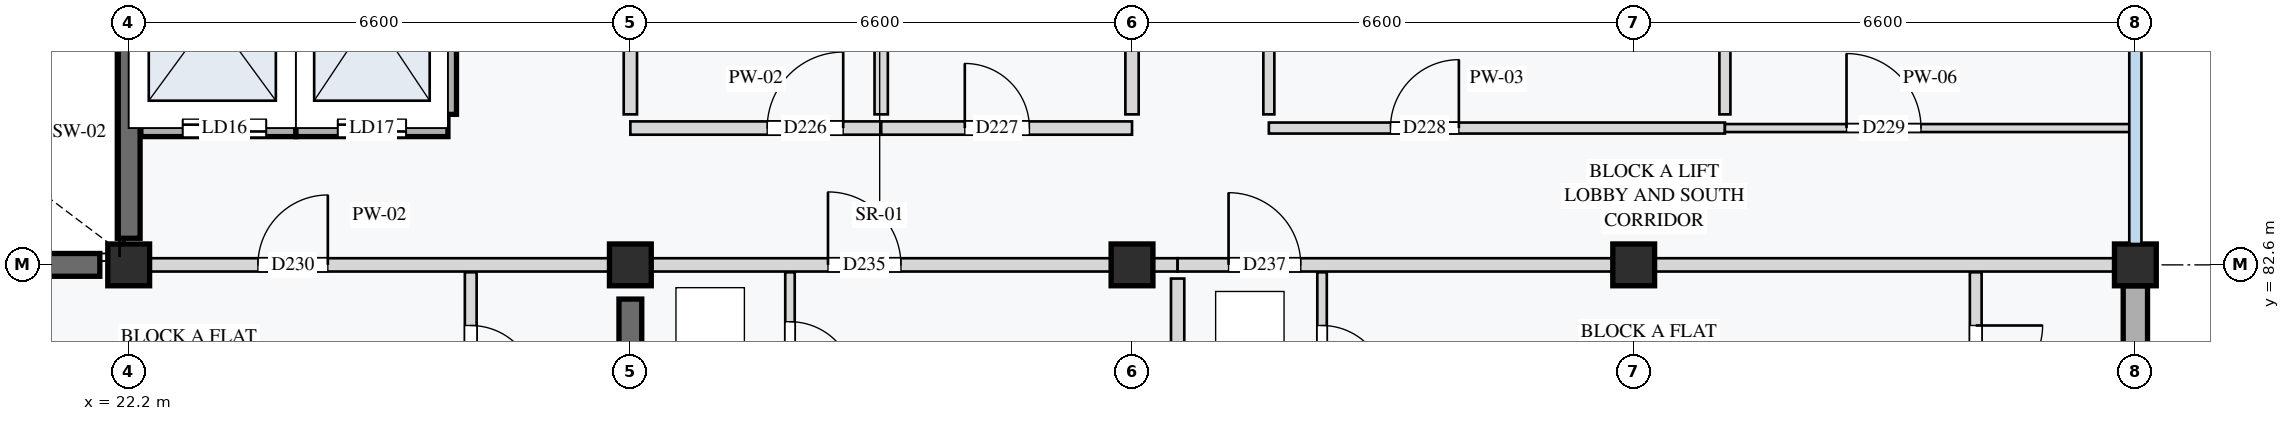
"""IFC4 building model, lengths in metres.
Left out: names, types, materials, properties, quantities, classifications, styles, units other than length and angle.
Written with IfcOpenShell. Run it as: python <this file> out.ifc"""

import sys

from ifc_helpers import new_model, si_unit, direction, frame, frame_2d, origin, origin_2d, place, context, subcontext, project, spatial, rectangle, extrude, element, fill, save


model = new_model("IFC4")
c1 = context("Model", 3, precision=1e-05, world=origin(), true_north=direction((0.0, 1.0)))
c2 = subcontext(c1, "Body", "Model", "MODEL_VIEW")
j1 = project(units=[si_unit("LENGTHUNIT", "METRE"), si_unit("PLANEANGLEUNIT", "RADIAN")], contexts=[c1])
p1 = place(None, origin())
s1 = spatial("IfcSite", under=j1, at=p1, CompositionType="ELEMENT")
p2 = place(p1, origin())
s2 = spatial("IfcBuilding", under=s1, at=p2, CompositionType="ELEMENT")
p3 = place(p2, frame((0.0, 0.0, 24.4)))
s3 = spatial("IfcBuildingStorey", under=s2, at=p3, CompositionType="ELEMENT", Elevation=24.4)
for number, where, z_axis, x_axis in (
    (1, (22.2, 82.6, 0.0), (0.0, 0.0, 1.0), (1.0, 0.0, 0.0)),
    (2, (28.8, 82.6, 0.0), (0.0, 0.0, 1.0), (1.0, 0.0, 0.0)),
    (3, (35.4, 82.6, 0.0), (0.0, 0.0, 1.0), (1.0, 0.0, 0.0)),
    (4, (42.0, 82.6, 0.0), (0.0, 0.0, 1.0), (1.0, 0.0, 0.0)),
    (5, (48.6, 82.6, 0.0), (0.0, 0.0, 1.0), (1.0, 0.0, 0.0)),
):
    element("IfcColumn", number, at=place(p3, frame(where, z_axis=z_axis, x_axis=x_axis)), inside=s3, PredefinedType="COLUMN", context=c2, shape_type="SweptSolid", body=[
        extrude(rectangle(XDim=0.55, YDim=0.55, at=origin_2d()), origin(), (0.0, 0.0, 1.0), 3.2),
    ])
p4 = place(p3, frame((15.98, 82.6, 0.0), z_axis=(0.0, 0.0, 1.0), x_axis=(1.0, 0.0, 0.0)))
e6 = element("IfcWall", 6, at=p4, inside=s3, PredefinedType="SHEAR", context=c2, shape_type="SweptSolid", body=[
    extrude(rectangle(XDim=5.84, YDim=0.3, at=frame_2d((2.92, 0.0))), origin(), (0.0, 0.0, 1.0), 2.97),
])
p5 = place(p3, frame((22.2, 82.95, 0.0), z_axis=(0.0, 0.0, 1.0), x_axis=(0.0, 1.0, 0.0)))
e7 = element("IfcWall", 7, at=p5, inside=s3, PredefinedType="SHEAR", context=c2, shape_type="SweptSolid", body=[
    extrude(rectangle(XDim=2.8, YDim=0.3, at=frame_2d((1.4, 0.0))), origin(), (0.0, 0.0, 1.0), 2.97),
])
p6 = place(p3, frame((28.8, 76.45, 0.0), z_axis=(0.0, 0.0, 1.0), x_axis=(0.0, 1.0, 0.0)))
e8 = element("IfcWall", 8, at=p6, inside=s3, PredefinedType="SHEAR", context=c2, shape_type="SweptSolid", body=[
    extrude(rectangle(XDim=5.7, YDim=0.3, at=frame_2d((2.85, 0.0))), origin(), (0.0, 0.0, 1.0), 2.97),
])
p7 = place(p3, frame((48.6, 76.275, 0.0), z_axis=(0.0, 0.0, 1.0), x_axis=(0.0, 1.0, 0.0)))
e9 = element("IfcWall", 9, at=p7, inside=s3, PredefinedType="STANDARD", context=c2, shape_type="SweptSolid", body=[
    extrude(rectangle(XDim=6.05, YDim=0.32, at=frame_2d((3.025, 0.0))), origin(), (0.0, 0.0, 1.0), 2.65),
])
p8 = place(p3, frame((22.36, 84.4, 0.0), z_axis=(0.0, 0.0, 1.0), x_axis=(1.0, 0.0, 0.0)))
e10 = element("IfcWall", 10, at=p8, inside=s3, PredefinedType="STANDARD", context=c2, shape_type="SweptSolid", body=[
    extrude(rectangle(XDim=2.04, YDim=0.225, at=frame_2d((1.02, 0.0))), origin(), (0.0, 0.0, 1.0), 2.97),
])
p9 = place(p8, frame((0.55, 0.0, 0.0)))
e11 = element("IfcOpeningElement", 11, at=p9, cuts=e10, PredefinedType="OPENING", context=c2, shape_type="SweptSolid", body=[
    extrude(rectangle(XDim=1.1, YDim=2.1, at=frame_2d((0.55, 1.05))), frame((0.0, 0.123, 0.0), z_axis=(0.0, -1.0, 0.0), x_axis=(1.0, 0.0, 0.0)), (0.0, 0.0, 1.0), 0.245),
])
p10 = place(p3, frame((24.4, 84.4, 0.0), z_axis=(0.0, 0.0, 1.0), x_axis=(1.0, 0.0, 0.0)))
e12 = element("IfcWall", 12, at=p10, inside=s3, PredefinedType="STANDARD", context=c2, shape_type="SweptSolid", body=[
    extrude(rectangle(XDim=2.0, YDim=0.225, at=frame_2d((1.0, 0.0))), origin(), (0.0, 0.0, 1.0), 2.97),
])
p11 = place(p10, frame((0.55, 0.0, 0.0)))
e13 = element("IfcOpeningElement", 13, at=p11, cuts=e12, PredefinedType="OPENING", context=c2, shape_type="SweptSolid", body=[
    extrude(rectangle(XDim=0.9, YDim=2.1, at=frame_2d((0.45, 1.05))), frame((0.0, 0.123, 0.0), z_axis=(0.0, -1.0, 0.0), x_axis=(1.0, 0.0, 0.0)), (0.0, 0.0, 1.0), 0.245),
])
for number, where, z_axis, x_axis in (
    (14, (24.4, 84.58, 0.0), (0.0, 0.0, 1.0), (0.0, 1.0, 0.0)),
    (15, (26.4, 84.58, 0.0), (0.0, 0.0, 1.0), (0.0, 1.0, 0.0)),
):
    element("IfcWall", number, at=place(p3, frame(where, z_axis=z_axis, x_axis=x_axis)), inside=s3, PredefinedType="STANDARD", context=c2, shape_type="SweptSolid", body=[
        extrude(rectangle(XDim=2.64, YDim=0.225, at=frame_2d((1.32, 0.0))), origin(), (0.0, 0.0, 1.0), 2.97),
    ])
p12 = place(p3, frame((28.8, 84.4, 0.0), z_axis=(0.0, 0.0, 1.0), x_axis=(1.0, 0.0, 0.0)))
e16 = element("IfcWall", 16, at=p12, inside=s3, PredefinedType="PARTITIONING", context=c2, shape_type="SweptSolid", body=[
    extrude(rectangle(XDim=3.3, YDim=0.175, at=frame_2d((1.65, 0.0))), origin(), (0.0, 0.0, 1.0), 2.97),
])
p13 = place(p12, frame((1.8, 0.0, 0.0)))
e17 = element("IfcOpeningElement", 17, at=p13, cuts=e16, PredefinedType="OPENING", context=c2, shape_type="SweptSolid", body=[
    extrude(rectangle(XDim=1.0, YDim=2.1, at=frame_2d((0.5, 1.05))), frame((0.0, 0.097, 0.0), z_axis=(0.0, -1.0, 0.0), x_axis=(1.0, 0.0, 0.0)), (0.0, 0.0, 1.0), 0.195),
])
p14 = place(p3, frame((32.1, 84.4, 0.0), z_axis=(0.0, 0.0, 1.0), x_axis=(1.0, 0.0, 0.0)))
e18 = element("IfcWall", 18, at=p14, inside=s3, PredefinedType="PARTITIONING", context=c2, shape_type="SweptSolid", body=[
    extrude(rectangle(XDim=3.3, YDim=0.175, at=frame_2d((1.65, 0.0))), origin(), (0.0, 0.0, 1.0), 2.97),
])
p15 = place(p14, frame((1.1, 0.0, 0.0)))
e19 = element("IfcOpeningElement", 19, at=p15, cuts=e18, PredefinedType="OPENING", context=c2, shape_type="SweptSolid", body=[
    extrude(rectangle(XDim=0.85, YDim=2.0, at=frame_2d((0.425, 1.0))), frame((0.0, 0.097, 0.0), z_axis=(0.0, -1.0, 0.0), x_axis=(1.0, 0.0, 0.0)), (0.0, 0.0, 1.0), 0.195),
])
for number, where, z_axis, x_axis in (
    (20, (28.8, 84.58, 0.0), (0.0, 0.0, 1.0), (0.0, 1.0, 0.0)),
    (21, (32.1, 84.58, 0.0), (0.0, 0.0, 1.0), (0.0, 1.0, 0.0)),
    (22, (35.4, 84.58, 0.0), (0.0, 0.0, 1.0), (0.0, 1.0, 0.0)),
):
    element("IfcWall", number, at=place(p3, frame(where, z_axis=z_axis, x_axis=x_axis)), inside=s3, PredefinedType="PARTITIONING", context=c2, shape_type="SweptSolid", body=[
        extrude(rectangle(XDim=1.14, YDim=0.175, at=frame_2d((0.57, 0.0))), origin(), (0.0, 0.0, 1.0), 2.97),
    ])
p16 = place(p3, frame((37.2, 84.4, 0.0), z_axis=(0.0, 0.0, 1.0), x_axis=(1.0, 0.0, 0.0)))
e23 = element("IfcWall", 23, at=p16, inside=s3, PredefinedType="PARTITIONING", context=c2, shape_type="SweptSolid", body=[
    extrude(rectangle(XDim=6.0, YDim=0.145, at=frame_2d((3.0, 0.0))), origin(), (0.0, 0.0, 1.0), 2.97),
])
p17 = place(p16, frame((1.6, 0.0, 0.0)))
e24 = element("IfcOpeningElement", 24, at=p17, cuts=e23, PredefinedType="OPENING", context=c2, shape_type="SweptSolid", body=[
    extrude(rectangle(XDim=0.9, YDim=2.16, at=frame_2d((0.45, 1.08))), frame((0.0, 0.083, 0.0), z_axis=(0.0, -1.0, 0.0), x_axis=(1.0, 0.0, 0.0)), (0.0, 0.0, 1.0), 0.165),
])
p18 = place(p3, frame((43.2, 84.4, 0.0), z_axis=(0.0, 0.0, 1.0), x_axis=(1.0, 0.0, 0.0)))
e25 = element("IfcWall", 25, at=p18, inside=s3, PredefinedType="PARTITIONING", context=c2, shape_type="SweptSolid", body=[
    extrude(rectangle(XDim=5.4, YDim=0.105, at=frame_2d((2.7, 0.0))), origin(), (0.0, 0.0, 1.0), 2.97),
])
p19 = place(p18, frame((1.6, 0.0, 0.0)))
e26 = element("IfcOpeningElement", 26, at=p19, cuts=e25, PredefinedType="OPENING", context=c2, shape_type="SweptSolid", body=[
    extrude(rectangle(XDim=0.98, YDim=2.12, at=frame_2d((0.49, 1.06))), frame((0.0, 0.062, 0.0), z_axis=(0.0, -1.0, 0.0), x_axis=(1.0, 0.0, 0.0)), (0.0, 0.0, 1.0), 0.125),
])
for number, where, z_axis, x_axis in (
    (27, (43.2, 84.58, 0.0), (0.0, 0.0, 1.0), (0.0, 1.0, 0.0)),
    (28, (37.2, 84.58, 0.0), (0.0, 0.0, 1.0), (0.0, 1.0, 0.0)),
):
    element("IfcWall", number, at=place(p3, frame(where, z_axis=z_axis, x_axis=x_axis)), inside=s3, PredefinedType="PARTITIONING", context=c2, shape_type="SweptSolid", body=[
        extrude(rectangle(XDim=2.64, YDim=0.145, at=frame_2d((1.32, 0.0))), origin(), (0.0, 0.0, 1.0), 2.97),
    ])
p20 = place(p3, frame((22.2, 82.6, 0.0), z_axis=(0.0, 0.0, 1.0), x_axis=(1.0, 0.0, 0.0)))
e29 = element("IfcWall", 29, at=p20, inside=s3, PredefinedType="PARTITIONING", context=c2, shape_type="SweptSolid", body=[
    extrude(rectangle(XDim=6.6, YDim=0.175, at=frame_2d((3.3, 0.0))), origin(), (0.0, 0.0, 1.0), 2.7),
])
p21 = place(p20, frame((1.7, 0.0, 0.0)))
e30 = element("IfcOpeningElement", 30, at=p21, cuts=e29, PredefinedType="OPENING", context=c2, shape_type="SweptSolid", body=[
    extrude(rectangle(XDim=0.92, YDim=2.14, at=frame_2d((0.46, 1.07))), frame((0.0, 0.097, 0.0), z_axis=(0.0, -1.0, 0.0), x_axis=(1.0, 0.0, 0.0)), (0.0, 0.0, 1.0), 0.195),
])
p22 = place(p3, frame((26.7, 82.502, 0.0), z_axis=(0.0, 0.0, 1.0), x_axis=(0.0, -1.0, 0.0)))
e31 = element("IfcWall", 31, at=p22, inside=s3, PredefinedType="PARTITIONING", context=c2, shape_type="SweptSolid", body=[
    extrude(rectangle(XDim=2.302, YDim=0.155, at=frame_2d((1.151, 0.0))), origin(), (0.0, 0.0, 1.0), 2.97),
])
p23 = place(p22, frame((0.7, 0.0, 0.0)))
e32 = element("IfcOpeningElement", 32, at=p23, cuts=e31, PredefinedType="OPENING", context=c2, shape_type="SweptSolid", body=[
    extrude(rectangle(XDim=0.86, YDim=2.12, at=frame_2d((0.43, 1.06))), frame((0.0, 0.087, 0.0), z_axis=(0.0, -1.0, 0.0), x_axis=(1.0, 0.0, 0.0)), (0.0, 0.0, 1.0), 0.175),
])
p24 = place(p3, frame((28.8, 82.6, 0.0), z_axis=(0.0, 0.0, 1.0), x_axis=(1.0, 0.0, 0.0)))
e33 = element("IfcWall", 33, at=p24, inside=s3, PredefinedType="PARTITIONING", context=c2, shape_type="SweptSolid", body=[
    extrude(rectangle(XDim=7.2, YDim=0.175, at=frame_2d((3.6, 0.0))), origin(), (0.0, 0.0, 1.0), 2.7),
])
p25 = place(p24, frame((2.6, 0.0, 0.0)))
e34 = element("IfcOpeningElement", 34, at=p25, cuts=e33, PredefinedType="OPENING", context=c2, shape_type="SweptSolid", body=[
    extrude(rectangle(XDim=0.96, YDim=2.18, at=frame_2d((0.48, 1.09))), frame((0.0, 0.097, 0.0), z_axis=(0.0, -1.0, 0.0), x_axis=(1.0, 0.0, 0.0)), (0.0, 0.0, 1.0), 0.195),
])
p26 = place(p3, frame((30.9, 82.502, 0.0), z_axis=(0.0, 0.0, 1.0), x_axis=(0.0, -1.0, 0.0)))
e35 = element("IfcWall", 35, at=p26, inside=s3, PredefinedType="PARTITIONING", context=c2, shape_type="SweptSolid", body=[
    extrude(rectangle(XDim=2.202, YDim=0.125, at=frame_2d((1.101, 0.0))), origin(), (0.0, 0.0, 1.0), 2.97),
])
p27 = place(p26, frame((0.65, 0.0, 0.0)))
e36 = element("IfcOpeningElement", 36, at=p27, cuts=e35, PredefinedType="OPENING", context=c2, shape_type="SweptSolid", body=[
    extrude(rectangle(XDim=0.85, YDim=2.04, at=frame_2d((0.425, 1.02))), frame((0.0, 0.073, 0.0), z_axis=(0.0, -1.0, 0.0), x_axis=(1.0, 0.0, 0.0)), (0.0, 0.0, 1.0), 0.145),
])
p28 = place(p3, frame((36.0, 82.42, 0.0), z_axis=(0.0, 0.0, 1.0), x_axis=(0.0, -1.0, 0.0)))
e37 = element("IfcWall", 37, at=p28, inside=s3, PredefinedType="PARTITIONING", context=c2, shape_type="SweptSolid", body=[
    extrude(rectangle(XDim=6.19, YDim=0.175, at=frame_2d((3.095, 0.0))), origin(), (0.0, 0.0, 1.0), 2.97),
])
p29 = place(p3, frame((36.0, 82.6, 0.0), z_axis=(0.0, 0.0, 1.0), x_axis=(1.0, 0.0, 0.0)))
e38 = element("IfcWall", 38, at=p29, inside=s3, PredefinedType="PARTITIONING", context=c2, shape_type="SweptSolid", body=[
    extrude(rectangle(XDim=12.6, YDim=0.175, at=frame_2d((6.3, 0.0))), origin(), (0.0, 0.0, 1.0), 2.7),
])
p30 = place(p29, frame((0.67, 0.0, 0.0)))
e39 = element("IfcOpeningElement", 39, at=p30, cuts=e38, PredefinedType="OPENING", context=c2, shape_type="SweptSolid", body=[
    extrude(rectangle(XDim=0.95, YDim=2.16, at=frame_2d((0.475, 1.08))), frame((0.0, 0.097, 0.0), z_axis=(0.0, -1.0, 0.0), x_axis=(1.0, 0.0, 0.0)), (0.0, 0.0, 1.0), 0.195),
])
p31 = place(p3, frame((37.9, 82.502, 0.0), z_axis=(0.0, 0.0, 1.0), x_axis=(0.0, -1.0, 0.0)))
e40 = element("IfcWall", 40, at=p31, inside=s3, PredefinedType="PARTITIONING", context=c2, shape_type="SweptSolid", body=[
    extrude(rectangle(XDim=2.302, YDim=0.125, at=frame_2d((1.151, 0.0))), origin(), (0.0, 0.0, 1.0), 2.97),
])
p32 = place(p31, frame((0.7, 0.0, 0.0)))
e41 = element("IfcOpeningElement", 41, at=p32, cuts=e40, PredefinedType="OPENING", context=c2, shape_type="SweptSolid", body=[
    extrude(rectangle(XDim=0.84, YDim=2.06, at=frame_2d((0.42, 1.03))), frame((0.0, 0.073, 0.0), z_axis=(0.0, -1.0, 0.0), x_axis=(1.0, 0.0, 0.0)), (0.0, 0.0, 1.0), 0.145),
])
p33 = place(p3, frame((46.5, 82.502, 0.0), z_axis=(0.0, 0.0, 1.0), x_axis=(0.0, -1.0, 0.0)))
e42 = element("IfcWall", 42, at=p33, inside=s3, PredefinedType="PARTITIONING", context=c2, shape_type="SweptSolid", body=[
    extrude(rectangle(XDim=2.302, YDim=0.155, at=frame_2d((1.151, 0.0))), origin(), (0.0, 0.0, 1.0), 2.97),
])
p34 = place(p33, frame((0.7, 0.0, 0.0)))
e43 = element("IfcOpeningElement", 43, at=p34, cuts=e42, PredefinedType="OPENING", context=c2, shape_type="SweptSolid", body=[
    extrude(rectangle(XDim=0.88, YDim=2.1, at=frame_2d((0.44, 1.05))), frame((0.0, 0.087, 0.0), z_axis=(0.0, -1.0, 0.0), x_axis=(1.0, 0.0, 0.0)), (0.0, 0.0, 1.0), 0.175),
])
p35 = place(p9, origin())
e44 = element("IfcDoor", 44, at=p35, inside=s3, OperationType="DOUBLE_DOOR_SLIDING", PredefinedType="DOOR", context=c2, shape_type="SweptSolid", body=[
    extrude(rectangle(XDim=1.1, YDim=2.1, at=frame_2d((0.55, 1.05))), frame((0.0, 0.025, 0.0), z_axis=(0.0, -1.0, 0.0), x_axis=(1.0, 0.0, 0.0)), (0.0, 0.0, 1.0), 0.05),
])
fill(e11, e44)
p36 = place(p11, origin())
e45 = element("IfcDoor", 45, at=p36, inside=s3, OperationType="DOUBLE_DOOR_SLIDING", PredefinedType="DOOR", context=c2, shape_type="SweptSolid", body=[
    extrude(rectangle(XDim=0.9, YDim=2.1, at=frame_2d((0.45, 1.05))), frame((0.0, 0.025, 0.0), z_axis=(0.0, -1.0, 0.0), x_axis=(1.0, 0.0, 0.0)), (0.0, 0.0, 1.0), 0.05),
])
fill(e13, e45)
p37 = place(p13, origin())
e46 = element("IfcDoor", 46, at=p37, inside=s3, OperationType="SINGLE_SWING_RIGHT", PredefinedType="DOOR", context=c2, shape_type="SweptSolid", body=[
    extrude(rectangle(XDim=1.0, YDim=2.1, at=frame_2d((0.5, 1.05))), frame((0.0, 0.025, 0.0), z_axis=(0.0, -1.0, 0.0), x_axis=(1.0, 0.0, 0.0)), (0.0, 0.0, 1.0), 0.05),
])
fill(e17, e46)
p38 = place(p15, origin())
e47 = element("IfcDoor", 47, at=p38, inside=s3, OperationType="SINGLE_SWING_LEFT", PredefinedType="DOOR", context=c2, shape_type="SweptSolid", body=[
    extrude(rectangle(XDim=0.85, YDim=2.0, at=frame_2d((0.425, 1.0))), frame((0.0, 0.025, 0.0), z_axis=(0.0, -1.0, 0.0), x_axis=(1.0, 0.0, 0.0)), (0.0, 0.0, 1.0), 0.05),
])
fill(e19, e47)
p39 = place(p17, origin())
e48 = element("IfcDoor", 48, at=p39, inside=s3, OperationType="SINGLE_SWING_RIGHT", PredefinedType="DOOR", context=c2, shape_type="SweptSolid", body=[
    extrude(rectangle(XDim=0.9, YDim=2.16, at=frame_2d((0.45, 1.08))), frame((0.0, 0.025, 0.0), z_axis=(0.0, -1.0, 0.0), x_axis=(1.0, 0.0, 0.0)), (0.0, 0.0, 1.0), 0.05),
])
fill(e24, e48)
p40 = place(p19, origin())
e49 = element("IfcDoor", 49, at=p40, inside=s3, OperationType="SINGLE_SWING_LEFT", PredefinedType="DOOR", context=c2, shape_type="SweptSolid", body=[
    extrude(rectangle(XDim=0.98, YDim=2.12, at=frame_2d((0.49, 1.06))), frame((0.0, 0.025, 0.0), z_axis=(0.0, -1.0, 0.0), x_axis=(1.0, 0.0, 0.0)), (0.0, 0.0, 1.0), 0.05),
])
fill(e26, e49)
p41 = place(p21, origin())
e50 = element("IfcDoor", 50, at=p41, inside=s3, OperationType="SINGLE_SWING_RIGHT", PredefinedType="DOOR", context=c2, shape_type="SweptSolid", body=[
    extrude(rectangle(XDim=0.92, YDim=2.14, at=frame_2d((0.46, 1.07))), frame((0.0, 0.025, 0.0), z_axis=(0.0, -1.0, 0.0), x_axis=(1.0, 0.0, 0.0)), (0.0, 0.0, 1.0), 0.05),
])
fill(e30, e50)
p42 = place(p23, origin())
e51 = element("IfcDoor", 51, at=p42, inside=s3, OperationType="SINGLE_SWING_RIGHT", PredefinedType="DOOR", context=c2, shape_type="SweptSolid", body=[
    extrude(rectangle(XDim=0.86, YDim=2.12, at=frame_2d((0.43, 1.06))), frame((0.0, 0.025, 0.0), z_axis=(0.0, -1.0, 0.0), x_axis=(1.0, 0.0, 0.0)), (0.0, 0.0, 1.0), 0.05),
])
fill(e32, e51)
p43 = place(p25, origin())
e52 = element("IfcDoor", 52, at=p43, inside=s3, OperationType="SINGLE_SWING_LEFT", PredefinedType="DOOR", context=c2, shape_type="SweptSolid", body=[
    extrude(rectangle(XDim=0.96, YDim=2.18, at=frame_2d((0.48, 1.09))), frame((0.0, 0.025, 0.0), z_axis=(0.0, -1.0, 0.0), x_axis=(1.0, 0.0, 0.0)), (0.0, 0.0, 1.0), 0.05),
])
fill(e34, e52)
p44 = place(p27, origin())
e53 = element("IfcDoor", 53, at=p44, inside=s3, OperationType="SINGLE_SWING_RIGHT", PredefinedType="DOOR", context=c2, shape_type="SweptSolid", body=[
    extrude(rectangle(XDim=0.85, YDim=2.04, at=frame_2d((0.425, 1.02))), frame((0.0, 0.025, 0.0), z_axis=(0.0, -1.0, 0.0), x_axis=(1.0, 0.0, 0.0)), (0.0, 0.0, 1.0), 0.05),
])
fill(e36, e53)
p45 = place(p30, origin())
e54 = element("IfcDoor", 54, at=p45, inside=s3, OperationType="SINGLE_SWING_LEFT", PredefinedType="DOOR", context=c2, shape_type="SweptSolid", body=[
    extrude(rectangle(XDim=0.95, YDim=2.16, at=frame_2d((0.475, 1.08))), frame((0.0, 0.025, 0.0), z_axis=(0.0, -1.0, 0.0), x_axis=(1.0, 0.0, 0.0)), (0.0, 0.0, 1.0), 0.05),
])
fill(e39, e54)
p46 = place(p32, origin())
e55 = element("IfcDoor", 55, at=p46, inside=s3, OperationType="SINGLE_SWING_RIGHT", PredefinedType="DOOR", context=c2, shape_type="SweptSolid", body=[
    extrude(rectangle(XDim=0.84, YDim=2.06, at=frame_2d((0.42, 1.03))), frame((0.0, 0.025, 0.0), z_axis=(0.0, -1.0, 0.0), x_axis=(1.0, 0.0, 0.0)), (0.0, 0.0, 1.0), 0.05),
])
fill(e41, e55)
p47 = place(p34, origin())
e56 = element("IfcDoor", 56, at=p47, inside=s3, OperationType="SINGLE_SWING_LEFT", PredefinedType="DOOR", context=c2, shape_type="SweptSolid", body=[
    extrude(rectangle(XDim=0.88, YDim=2.1, at=frame_2d((0.44, 1.05))), frame((0.0, 0.025, 0.0), z_axis=(0.0, -1.0, 0.0), x_axis=(1.0, 0.0, 0.0)), (0.0, 0.0, 1.0), 0.05),
])
fill(e43, e56)
save(model, sys.argv[1])
